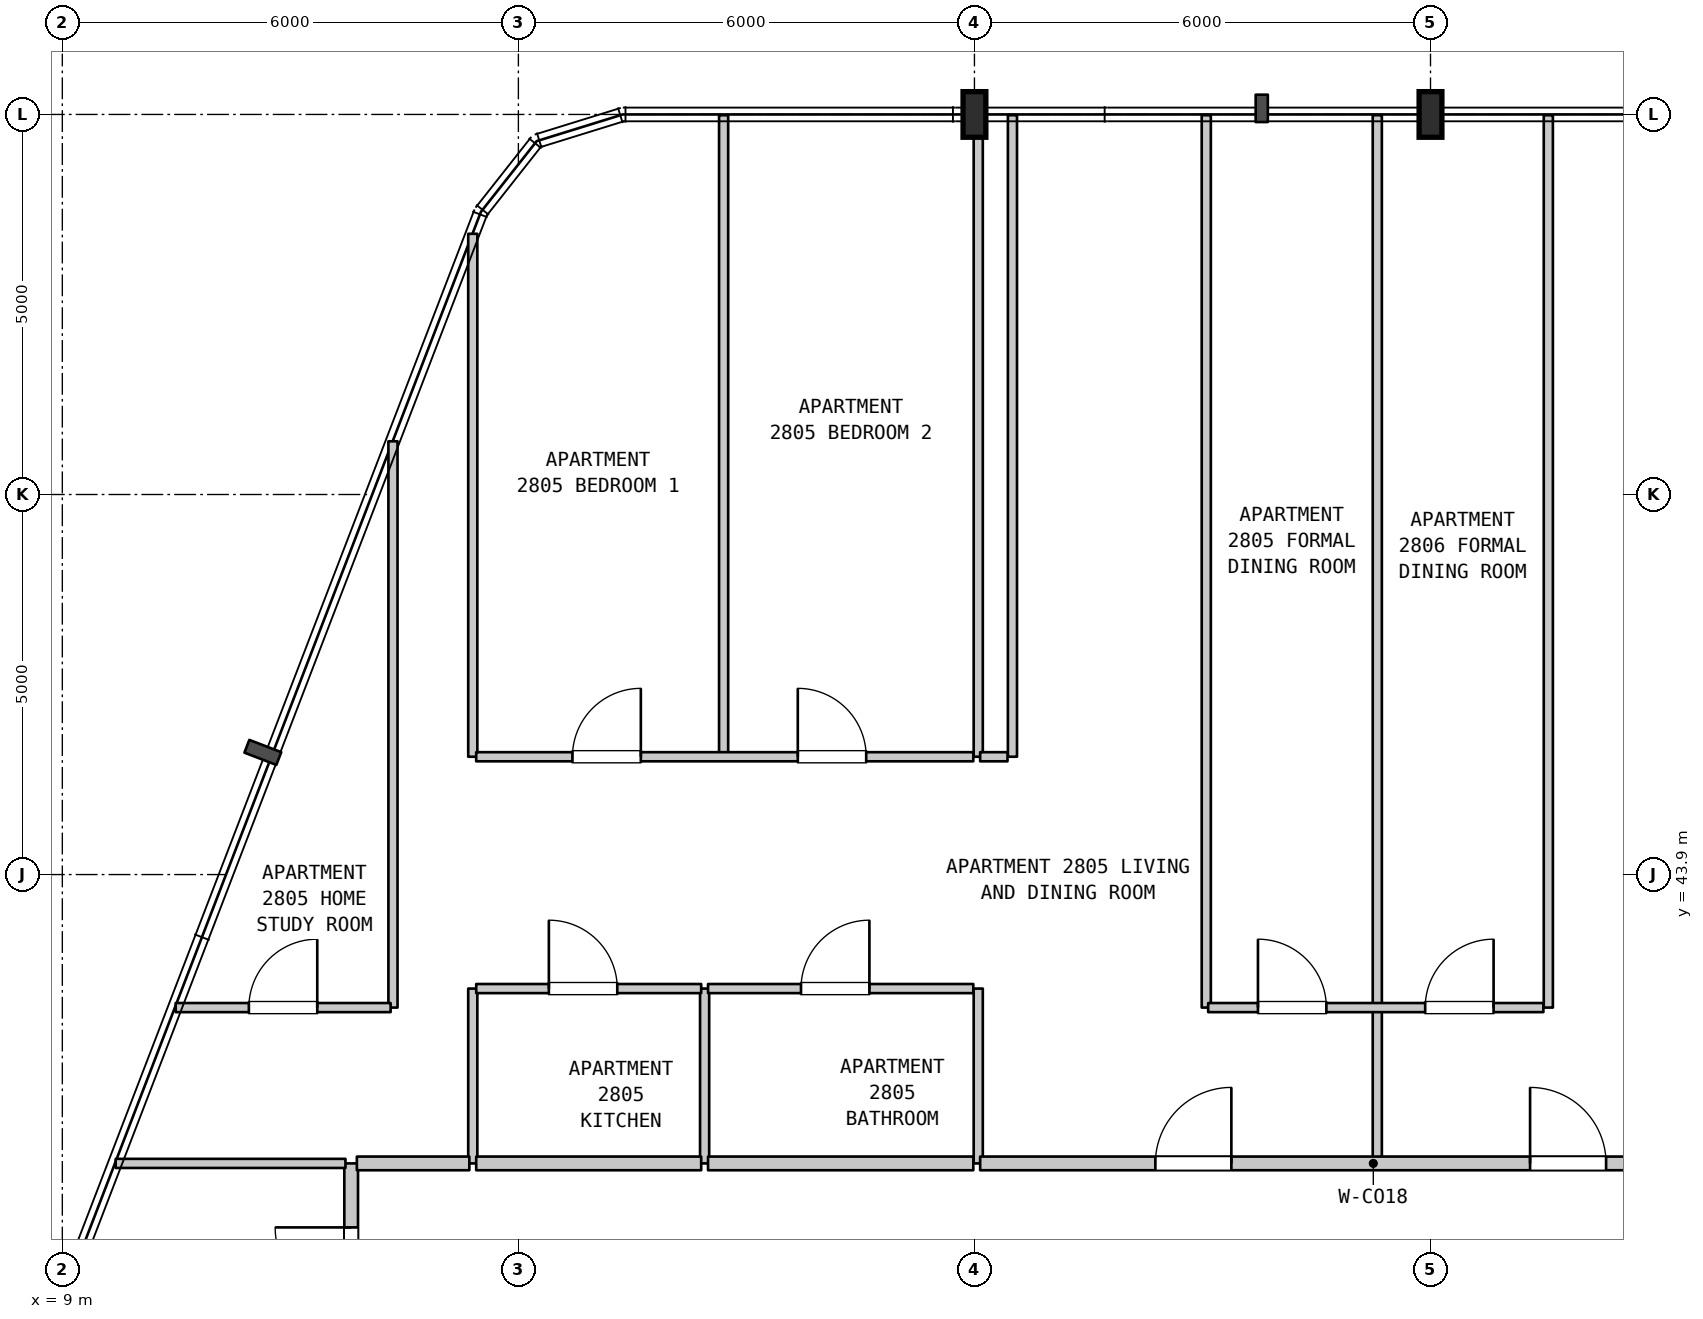
"""IFC4 building model, lengths in metres.
Left out: names, types, materials, properties, quantities, classifications, styles, units other than length and angle.
Written with IfcOpenShell. Run it as: python <this file> out.ifc"""

import sys

from ifc_helpers import new_model, si_unit, direction, frame, frame_2d, origin, origin_2d, place, context, subcontext, project, spatial, rectangle, i_section, extrude, element, fill, save


model = new_model("IFC4")
c1 = context("Model", 3, precision=1e-05, world=origin(), true_north=direction((0.0, 1.0)))
c2 = subcontext(c1, "Body", "Model", "MODEL_VIEW")
j1 = project(units=[si_unit("LENGTHUNIT", "METRE"), si_unit("PLANEANGLEUNIT", "RADIAN")], contexts=[c1])
p1 = place(None, origin())
s1 = spatial("IfcSite", under=j1, at=p1, CompositionType="ELEMENT")
p2 = place(p1, origin())
s2 = spatial("IfcBuilding", under=s1, at=p2, CompositionType="ELEMENT")
p3 = place(p2, frame((0.0, 0.0, 116.8)))
s3 = spatial("IfcBuildingStorey", under=s2, at=p3, CompositionType="ELEMENT", Elevation=116.8)
for number, where, z_axis, x_axis in (
    (1, (21.0, 53.9, 0.0), (0.0, 0.0, 1.0), (1.0, 0.0, 0.0)),
    (2, (27.0, 53.9, 0.0), (0.0, 0.0, 1.0), (1.0, 0.0, 0.0)),
):
    element("IfcColumn", number, at=place(p3, frame(where, z_axis=z_axis, x_axis=x_axis)), inside=s3, PredefinedType="COLUMN", context=c2, shape_type="SweptSolid", body=[
        extrude(i_section(OverallWidth=0.3, OverallDepth=0.6, WebThickness=0.015, FlangeThickness=0.03, FilletRadius=0.027, at=origin_2d()), origin(), (0.0, 0.0, 1.0), 3.7),
    ])
p4 = place(p3, frame((12.8, 37.416, 0.0), z_axis=(0.0, 0.0, 1.0), x_axis=(0.0, 1.0, 0.0)))
e3 = element("IfcWall", 3, at=p4, inside=s3, PredefinedType="STANDARD", context=c2, shape_type="SweptSolid", body=[
    extrude(rectangle(XDim=2.684, YDim=0.18, at=frame_2d((1.342, 0.0))), origin(), (0.0, 0.0, 1.0), 3.38),
])
p5 = place(p4, frame((0.842, 0.0, 0.0)))
e4 = element("IfcOpeningElement", 4, at=p5, cuts=e3, PredefinedType="OPENING", context=c2, shape_type="SweptSolid", body=[
    extrude(rectangle(XDim=1.0, YDim=2.15, at=frame_2d((0.5, 1.075))), frame((0.0, 0.1, 0.0), z_axis=(0.0, -1.0, 0.0), x_axis=(1.0, 0.0, 0.0)), (0.0, 0.0, 1.0), 0.2),
])
p6 = place(p3, frame((13.35, 42.15, 0.0), z_axis=(0.0, 0.0, 1.0), x_axis=(0.0, 1.0, 0.0)))
e5 = element("IfcWall", 5, at=p6, inside=s3, PredefinedType="PARTITIONING", context=c2, shape_type="SweptSolid", body=[
    extrude(rectangle(XDim=7.45, YDim=0.12, at=frame_2d((3.725, 0.0))), origin(), (0.0, 0.0, 1.0), 3.38),
])
p7 = place(p3, frame((14.4, 40.1, 0.0), z_axis=(0.0, 0.0, 1.0), x_axis=(0.0, 1.0, 0.0)))
e6 = element("IfcWall", 6, at=p7, inside=s3, PredefinedType="PARTITIONING", context=c2, shape_type="SweptSolid", body=[
    extrude(rectangle(XDim=2.3, YDim=0.12, at=frame_2d((1.15, 0.0))), origin(), (0.0, 0.0, 1.0), 3.38),
])
p8 = place(p3, frame((14.4, 45.45, 0.0), z_axis=(0.0, 0.0, 1.0), x_axis=(0.0, 1.0, 0.0)))
e7 = element("IfcWall", 7, at=p8, inside=s3, PredefinedType="PARTITIONING", context=c2, shape_type="SweptSolid", body=[
    extrude(rectangle(XDim=6.88, YDim=0.12, at=frame_2d((3.44, 0.0))), origin(), (0.0, 0.0, 1.0), 3.38),
])
p9 = place(p3, frame((17.45, 40.1, 0.0), z_axis=(0.0, 0.0, 1.0), x_axis=(0.0, 1.0, 0.0)))
e8 = element("IfcWall", 8, at=p9, inside=s3, PredefinedType="PARTITIONING", context=c2, shape_type="SweptSolid", body=[
    extrude(rectangle(XDim=2.3, YDim=0.12, at=frame_2d((1.15, 0.0))), origin(), (0.0, 0.0, 1.0), 3.38),
])
p10 = place(p3, frame((17.7, 45.45, 0.0), z_axis=(0.0, 0.0, 1.0), x_axis=(0.0, 1.0, 0.0)))
e9 = element("IfcWall", 9, at=p10, inside=s3, PredefinedType="PARTITIONING", context=c2, shape_type="SweptSolid", body=[
    extrude(rectangle(XDim=8.44, YDim=0.12, at=frame_2d((4.22, 0.0))), origin(), (0.0, 0.0, 1.0), 3.38),
])
p11 = place(p3, frame((21.05, 40.1, 0.0), z_axis=(0.0, 0.0, 1.0), x_axis=(0.0, 1.0, 0.0)))
e10 = element("IfcWall", 10, at=p11, inside=s3, PredefinedType="PARTITIONING", context=c2, shape_type="SweptSolid", body=[
    extrude(rectangle(XDim=2.3, YDim=0.12, at=frame_2d((1.15, 0.0))), origin(), (0.0, 0.0, 1.0), 3.08),
])
p12 = place(p3, frame((21.05, 45.45, 0.0), z_axis=(0.0, 0.0, 1.0), x_axis=(0.0, 1.0, 0.0)))
e11 = element("IfcWall", 11, at=p12, inside=s3, PredefinedType="PARTITIONING", context=c2, shape_type="SweptSolid", body=[
    extrude(rectangle(XDim=8.44, YDim=0.12, at=frame_2d((4.22, 0.0))), origin(), (0.0, 0.0, 1.0), 3.08),
])
p13 = place(p3, frame((21.5, 45.45, 0.0), z_axis=(0.0, 0.0, 1.0), x_axis=(0.0, 1.0, 0.0)))
e12 = element("IfcWall", 12, at=p13, inside=s3, PredefinedType="PARTITIONING", context=c2, shape_type="SweptSolid", body=[
    extrude(rectangle(XDim=8.44, YDim=0.12, at=frame_2d((4.22, 0.0))), origin(), (0.0, 0.0, 1.0), 3.38),
])
p14 = place(p3, frame((24.05, 42.15, 0.0), z_axis=(0.0, 0.0, 1.0), x_axis=(0.0, 1.0, 0.0)))
e13 = element("IfcWall", 13, at=p14, inside=s3, PredefinedType="PARTITIONING", context=c2, shape_type="SweptSolid", body=[
    extrude(rectangle(XDim=11.74, YDim=0.12, at=frame_2d((5.87, 0.0))), origin(), (0.0, 0.0, 1.0), 3.38),
])
p15 = place(p3, frame((26.3, 40.1, 0.0), z_axis=(0.0, 0.0, 1.0), x_axis=(0.0, 1.0, 0.0)))
e14 = element("IfcWall", 14, at=p15, inside=s3, PredefinedType="PARTITIONING", context=c2, shape_type="SweptSolid", body=[
    extrude(rectangle(XDim=2.05, YDim=0.12, at=frame_2d((1.025, 0.0))), origin(), (0.0, 0.0, 1.0), 3.38),
])
for number, where, z_axis, x_axis in (
    (15, (26.3, 42.15, 0.0), (0.0, 0.0, 1.0), (0.0, 1.0, 0.0)),
    (16, (28.55, 42.15, 0.0), (0.0, 0.0, 1.0), (0.0, 1.0, 0.0)),
):
    element("IfcWall", number, at=place(p3, frame(where, z_axis=z_axis, x_axis=x_axis)), inside=s3, PredefinedType="PARTITIONING", context=c2, shape_type="SweptSolid", body=[
        extrude(rectangle(XDim=11.74, YDim=0.12, at=frame_2d((5.87, 0.0))), origin(), (0.0, 0.0, 1.0), 3.38),
    ])
p16 = place(p3, frame((9.702, 40.1, 0.0), z_axis=(0.0, 0.0, 1.0), x_axis=(1.0, 0.0, 0.0)))
e17 = element("IfcWall", 17, at=p16, inside=s3, PredefinedType="PARTITIONING", context=c2, shape_type="SweptSolid", body=[
    extrude(rectangle(XDim=3.023, YDim=0.12, at=frame_2d((1.512, 0.0))), origin(), (0.0, 0.0, 1.0), 3.38),
])
p17 = place(p3, frame((12.875, 40.1, 0.0), z_axis=(0.0, 0.0, 1.0), x_axis=(1.0, 0.0, 0.0)))
e18 = element("IfcWall", 18, at=p17, inside=s3, PredefinedType="STANDARD", context=c2, shape_type="SweptSolid", body=[
    extrude(rectangle(XDim=1.48, YDim=0.18, at=frame_2d((0.74, 0.0))), origin(), (0.0, 0.0, 1.0), 3.38),
])
p18 = place(p3, frame((14.445, 40.1, 0.0), z_axis=(0.0, 0.0, 1.0), x_axis=(1.0, 0.0, 0.0)))
e19 = element("IfcWall", 19, at=p18, inside=s3, PredefinedType="STANDARD", context=c2, shape_type="SweptSolid", body=[
    extrude(rectangle(XDim=2.96, YDim=0.18, at=frame_2d((1.48, 0.0))), origin(), (0.0, 0.0, 1.0), 3.38),
])
p19 = place(p3, frame((17.495, 40.1, 0.0), z_axis=(0.0, 0.0, 1.0), x_axis=(1.0, 0.0, 0.0)))
e20 = element("IfcWall", 20, at=p19, inside=s3, PredefinedType="STANDARD", context=c2, shape_type="SweptSolid", body=[
    extrude(rectangle(XDim=3.49, YDim=0.18, at=frame_2d((1.745, 0.0))), origin(), (0.0, 0.0, 1.0), 3.38),
])
p20 = place(p3, frame((21.075, 40.1, 0.0), z_axis=(0.0, 0.0, 1.0), x_axis=(1.0, 0.0, 0.0)))
e21 = element("IfcWall", 21, at=p20, inside=s3, PredefinedType="STANDARD", context=c2, shape_type="SweptSolid", body=[
    extrude(rectangle(XDim=10.345, YDim=0.18, at=frame_2d((5.172, 0.0))), origin(), (0.0, 0.0, 1.0), 3.38),
])
p21 = place(p20, frame((2.305, 0.0, 0.0)))
e22 = element("IfcOpeningElement", 22, at=p21, cuts=e21, PredefinedType="OPENING", context=c2, shape_type="SweptSolid", body=[
    extrude(rectangle(XDim=1.0, YDim=2.15, at=frame_2d((0.5, 1.075))), frame((0.0, 0.1, 0.0), z_axis=(0.0, -1.0, 0.0), x_axis=(1.0, 0.0, 0.0)), (0.0, 0.0, 1.0), 0.2),
])
p22 = place(p20, frame((7.235, 0.0, 0.0)))
e23 = element("IfcOpeningElement", 23, at=p22, cuts=e21, PredefinedType="OPENING", context=c2, shape_type="SweptSolid", body=[
    extrude(rectangle(XDim=1.0, YDim=2.15, at=frame_2d((0.5, 1.075))), frame((0.0, 0.1, 0.0), z_axis=(0.0, -1.0, 0.0), x_axis=(1.0, 0.0, 0.0)), (0.0, 0.0, 1.0), 0.2),
])
p23 = place(p3, frame((10.491, 42.15, 0.0), z_axis=(0.0, 0.0, 1.0), x_axis=(1.0, 0.0, 0.0)))
e24 = element("IfcWall", 24, at=p23, inside=s3, PredefinedType="PARTITIONING", context=c2, shape_type="SweptSolid", body=[
    extrude(rectangle(XDim=2.828, YDim=0.12, at=frame_2d((1.414, 0.0))), origin(), (0.0, 0.0, 1.0), 3.38),
])
p24 = place(p23, frame((0.963, 0.0, 0.0)))
e25 = element("IfcOpeningElement", 25, at=p24, cuts=e24, PredefinedType="OPENING", context=c2, shape_type="SweptSolid", body=[
    extrude(rectangle(XDim=0.9, YDim=2.15, at=frame_2d((0.45, 1.075))), frame((0.0, 0.07, 0.0), z_axis=(0.0, -1.0, 0.0), x_axis=(1.0, 0.0, 0.0)), (0.0, 0.0, 1.0), 0.14),
])
p25 = place(p3, frame((24.075, 42.15, 0.0), z_axis=(0.0, 0.0, 1.0), x_axis=(1.0, 0.0, 0.0)))
e26 = element("IfcWall", 26, at=p25, inside=s3, PredefinedType="PARTITIONING", context=c2, shape_type="SweptSolid", body=[
    extrude(rectangle(XDim=4.41, YDim=0.12, at=frame_2d((2.205, 0.0))), origin(), (0.0, 0.0, 1.0), 3.38),
])
p26 = place(p25, frame((0.655, 0.0, 0.0)))
e27 = element("IfcOpeningElement", 27, at=p26, cuts=e26, PredefinedType="OPENING", context=c2, shape_type="SweptSolid", body=[
    extrude(rectangle(XDim=0.9, YDim=2.15, at=frame_2d((0.45, 1.075))), frame((0.0, 0.07, 0.0), z_axis=(0.0, -1.0, 0.0), x_axis=(1.0, 0.0, 0.0)), (0.0, 0.0, 1.0), 0.14),
])
p27 = place(p25, frame((2.855, 0.0, 0.0)))
e28 = element("IfcOpeningElement", 28, at=p27, cuts=e26, PredefinedType="OPENING", context=c2, shape_type="SweptSolid", body=[
    extrude(rectangle(XDim=0.9, YDim=2.15, at=frame_2d((0.45, 1.075))), frame((0.0, 0.07, 0.0), z_axis=(0.0, -1.0, 0.0), x_axis=(1.0, 0.0, 0.0)), (0.0, 0.0, 1.0), 0.14),
])
p28 = place(p3, frame((14.445, 42.4, 0.0), z_axis=(0.0, 0.0, 1.0), x_axis=(1.0, 0.0, 0.0)))
e29 = element("IfcWall", 29, at=p28, inside=s3, PredefinedType="PARTITIONING", context=c2, shape_type="SweptSolid", body=[
    extrude(rectangle(XDim=2.96, YDim=0.12, at=frame_2d((1.48, 0.0))), origin(), (0.0, 0.0, 1.0), 3.38),
])
p29 = place(p28, frame((0.956, 0.0, 0.0)))
e30 = element("IfcOpeningElement", 30, at=p29, cuts=e29, PredefinedType="OPENING", context=c2, shape_type="SweptSolid", body=[
    extrude(rectangle(XDim=0.9, YDim=2.15, at=frame_2d((0.45, 1.075))), frame((0.0, 0.07, 0.0), z_axis=(0.0, -1.0, 0.0), x_axis=(1.0, 0.0, 0.0)), (0.0, 0.0, 1.0), 0.14),
])
p30 = place(p3, frame((17.495, 42.4, 0.0), z_axis=(0.0, 0.0, 1.0), x_axis=(1.0, 0.0, 0.0)))
e31 = element("IfcWall", 31, at=p30, inside=s3, PredefinedType="PARTITIONING", context=c2, shape_type="SweptSolid", body=[
    extrude(rectangle(XDim=3.49, YDim=0.12, at=frame_2d((1.745, 0.0))), origin(), (0.0, 0.0, 1.0), 3.38),
])
p31 = place(p30, frame((1.223, 0.0, 0.0)))
e32 = element("IfcOpeningElement", 32, at=p31, cuts=e31, PredefinedType="OPENING", context=c2, shape_type="SweptSolid", body=[
    extrude(rectangle(XDim=0.9, YDim=2.1, at=frame_2d((0.45, 1.05))), frame((0.0, 0.07, 0.0), z_axis=(0.0, -1.0, 0.0), x_axis=(1.0, 0.0, 0.0)), (0.0, 0.0, 1.0), 0.14),
])
p32 = place(p3, frame((14.445, 45.45, 0.0), z_axis=(0.0, 0.0, 1.0), x_axis=(1.0, 0.0, 0.0)))
e33 = element("IfcWall", 33, at=p32, inside=s3, PredefinedType="PARTITIONING", context=c2, shape_type="SweptSolid", body=[
    extrude(rectangle(XDim=6.54, YDim=0.12, at=frame_2d((3.27, 0.0))), origin(), (0.0, 0.0, 1.0), 3.38),
])
p33 = place(p32, frame((1.266, 0.0, 0.0)))
e34 = element("IfcOpeningElement", 34, at=p33, cuts=e33, PredefinedType="OPENING", context=c2, shape_type="SweptSolid", body=[
    extrude(rectangle(XDim=0.9, YDim=2.15, at=frame_2d((0.45, 1.075))), frame((0.0, 0.07, 0.0), z_axis=(0.0, -1.0, 0.0), x_axis=(1.0, 0.0, 0.0)), (0.0, 0.0, 1.0), 0.14),
])
p34 = place(p32, frame((4.231, 0.0, 0.0)))
e35 = element("IfcOpeningElement", 35, at=p34, cuts=e33, PredefinedType="OPENING", context=c2, shape_type="SweptSolid", body=[
    extrude(rectangle(XDim=0.9, YDim=2.15, at=frame_2d((0.45, 1.075))), frame((0.0, 0.07, 0.0), z_axis=(0.0, -1.0, 0.0), x_axis=(1.0, 0.0, 0.0)), (0.0, 0.0, 1.0), 0.14),
])
p35 = place(p3, frame((21.075, 45.45, 0.0), z_axis=(0.0, 0.0, 1.0), x_axis=(1.0, 0.0, 0.0)))
e36 = element("IfcWall", 36, at=p35, inside=s3, PredefinedType="PARTITIONING", context=c2, shape_type="SweptSolid", body=[
    extrude(rectangle(XDim=0.36, YDim=0.12, at=frame_2d((0.18, 0.0))), origin(), (0.0, 0.0, 1.0), 3.38),
])
p36 = place(p5, origin())
e37 = element("IfcDoor", 37, at=p36, inside=s3, OperationType="SINGLE_SWING_RIGHT", PredefinedType="DOOR", context=c2, shape_type="SweptSolid", body=[
    extrude(rectangle(XDim=1.0, YDim=2.15, at=frame_2d((0.5, 1.075))), frame((0.0, 0.025, 0.0), z_axis=(0.0, -1.0, 0.0), x_axis=(1.0, 0.0, 0.0)), (0.0, 0.0, 1.0), 0.05),
])
fill(e4, e37)
p37 = place(p21, origin())
e38 = element("IfcDoor", 38, at=p37, inside=s3, OperationType="SINGLE_SWING_RIGHT", PredefinedType="DOOR", context=c2, shape_type="SweptSolid", body=[
    extrude(rectangle(XDim=1.0, YDim=2.15, at=frame_2d((0.5, 1.075))), frame((0.0, 0.025, 0.0), z_axis=(0.0, -1.0, 0.0), x_axis=(1.0, 0.0, 0.0)), (0.0, 0.0, 1.0), 0.05),
])
fill(e22, e38)
p38 = place(p22, origin())
e39 = element("IfcDoor", 39, at=p38, inside=s3, OperationType="SINGLE_SWING_LEFT", PredefinedType="DOOR", context=c2, shape_type="SweptSolid", body=[
    extrude(rectangle(XDim=1.0, YDim=2.15, at=frame_2d((0.5, 1.075))), frame((0.0, 0.025, 0.0), z_axis=(0.0, -1.0, 0.0), x_axis=(1.0, 0.0, 0.0)), (0.0, 0.0, 1.0), 0.05),
])
fill(e23, e39)
p39 = place(p24, origin())
e40 = element("IfcDoor", 40, at=p39, inside=s3, OperationType="SINGLE_SWING_RIGHT", PredefinedType="DOOR", context=c2, shape_type="SweptSolid", body=[
    extrude(rectangle(XDim=0.9, YDim=2.15, at=frame_2d((0.45, 1.075))), frame((0.0, 0.025, 0.0), z_axis=(0.0, -1.0, 0.0), x_axis=(1.0, 0.0, 0.0)), (0.0, 0.0, 1.0), 0.05),
])
fill(e25, e40)
p40 = place(p26, origin())
e41 = element("IfcDoor", 41, at=p40, inside=s3, OperationType="SINGLE_SWING_LEFT", PredefinedType="DOOR", context=c2, shape_type="SweptSolid", body=[
    extrude(rectangle(XDim=0.9, YDim=2.15, at=frame_2d((0.45, 1.075))), frame((0.0, 0.025, 0.0), z_axis=(0.0, -1.0, 0.0), x_axis=(1.0, 0.0, 0.0)), (0.0, 0.0, 1.0), 0.05),
])
fill(e27, e41)
p41 = place(p27, origin())
e42 = element("IfcDoor", 42, at=p41, inside=s3, OperationType="SINGLE_SWING_RIGHT", PredefinedType="DOOR", context=c2, shape_type="SweptSolid", body=[
    extrude(rectangle(XDim=0.9, YDim=2.15, at=frame_2d((0.45, 1.075))), frame((0.0, 0.025, 0.0), z_axis=(0.0, -1.0, 0.0), x_axis=(1.0, 0.0, 0.0)), (0.0, 0.0, 1.0), 0.05),
])
fill(e28, e42)
p42 = place(p29, origin())
e43 = element("IfcDoor", 43, at=p42, inside=s3, OperationType="SINGLE_SWING_LEFT", PredefinedType="DOOR", context=c2, shape_type="SweptSolid", body=[
    extrude(rectangle(XDim=0.9, YDim=2.15, at=frame_2d((0.45, 1.075))), frame((0.0, 0.025, 0.0), z_axis=(0.0, -1.0, 0.0), x_axis=(1.0, 0.0, 0.0)), (0.0, 0.0, 1.0), 0.05),
])
fill(e30, e43)
p43 = place(p31, origin())
e44 = element("IfcDoor", 44, at=p43, inside=s3, OperationType="SINGLE_SWING_RIGHT", PredefinedType="DOOR", context=c2, shape_type="SweptSolid", body=[
    extrude(rectangle(XDim=0.9, YDim=2.1, at=frame_2d((0.45, 1.05))), frame((0.0, 0.025, 0.0), z_axis=(0.0, -1.0, 0.0), x_axis=(1.0, 0.0, 0.0)), (0.0, 0.0, 1.0), 0.05),
])
fill(e32, e44)
p44 = place(p33, origin())
e45 = element("IfcDoor", 45, at=p44, inside=s3, OperationType="SINGLE_SWING_RIGHT", PredefinedType="DOOR", context=c2, shape_type="SweptSolid", body=[
    extrude(rectangle(XDim=0.9, YDim=2.15, at=frame_2d((0.45, 1.075))), frame((0.0, 0.025, 0.0), z_axis=(0.0, -1.0, 0.0), x_axis=(1.0, 0.0, 0.0)), (0.0, 0.0, 1.0), 0.05),
])
fill(e34, e45)
p45 = place(p34, origin())
e46 = element("IfcDoor", 46, at=p45, inside=s3, OperationType="SINGLE_SWING_LEFT", PredefinedType="DOOR", context=c2, shape_type="SweptSolid", body=[
    extrude(rectangle(XDim=0.9, YDim=2.15, at=frame_2d((0.45, 1.075))), frame((0.0, 0.025, 0.0), z_axis=(0.0, -1.0, 0.0), x_axis=(1.0, 0.0, 0.0)), (0.0, 0.0, 1.0), 0.05),
])
fill(e35, e46)
save(model, sys.argv[1])
